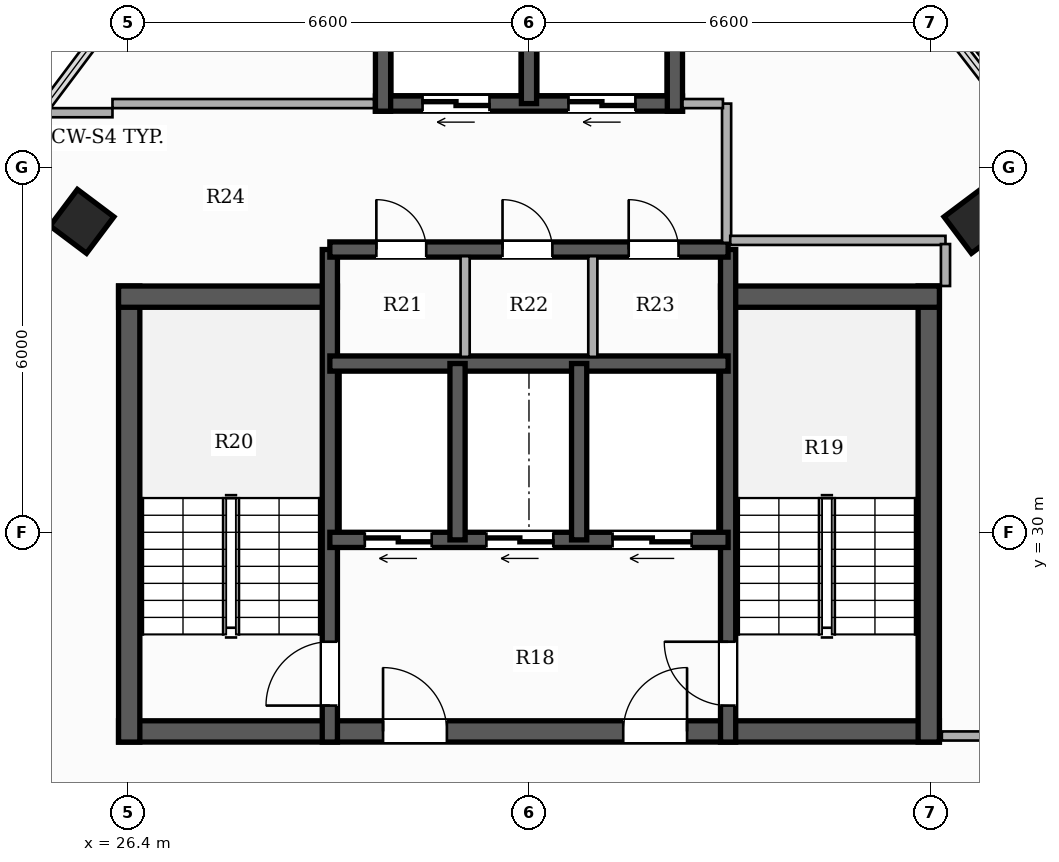
"""IFC4 building model, lengths in metres.
Left out: names, types, materials, properties, quantities, classifications, styles, units other than length and angle.
Written with IfcOpenShell. Run it as: python <this file> out.ifc"""

import sys

from ifc_helpers import new_model, si_unit, direction, frame, frame_2d, origin, origin_2d, place, context, subcontext, project, spatial, rectangle, hollow_rectangle, extrude, element, fill, save


model = new_model("IFC4")
c1 = context("Model", 3, precision=1e-05, world=origin(), true_north=direction((0.0, 1.0)))
c2 = subcontext(c1, "Body", "Model", "MODEL_VIEW")
j1 = project(units=[si_unit("LENGTHUNIT", "METRE"), si_unit("PLANEANGLEUNIT", "RADIAN")], contexts=[c1])
p1 = place(None, origin())
s1 = spatial("IfcSite", under=j1, at=p1, CompositionType="ELEMENT")
p2 = place(p1, origin())
s2 = spatial("IfcBuilding", under=s1, at=p2, CompositionType="ELEMENT")
p3 = place(p2, frame((0.0, 0.0, 240.35)))
s3 = spatial("IfcBuildingStorey", under=s2, at=p3, CompositionType="ELEMENT", Elevation=240.35)
p4 = place(p3, frame((26.25, 26.725, 0.0), z_axis=(0.0, 0.0, 1.0), x_axis=(1.0, 0.0, 0.0)))
e1 = element("IfcWall", 1, at=p4, inside=s3, PredefinedType="SHEAR", context=c2, shape_type="SweptSolid", body=[
    extrude(rectangle(XDim=13.5, YDim=0.35, at=frame_2d((6.75, 0.0))), origin(), (0.0, 0.0, 1.0), 3.3),
])
p5 = place(p4, frame((4.35, 0.0, 0.0)))
e2 = element("IfcOpeningElement", 2, at=p5, cuts=e1, PredefinedType="OPENING", context=c2, shape_type="SweptSolid", body=[
    extrude(rectangle(XDim=1.05, YDim=2.15, at=frame_2d((0.525, 1.075))), frame((0.0, 0.185, 0.0), z_axis=(0.0, -1.0, 0.0), x_axis=(1.0, 0.0, 0.0)), (0.0, 0.0, 1.0), 0.37),
])
p6 = place(p4, frame((8.3, 0.0, 0.0)))
e3 = element("IfcOpeningElement", 3, at=p6, cuts=e1, PredefinedType="OPENING", context=c2, shape_type="SweptSolid", body=[
    extrude(rectangle(XDim=1.05, YDim=2.15, at=frame_2d((0.525, 1.075))), frame((0.0, 0.185, 0.0), z_axis=(0.0, -1.0, 0.0), x_axis=(1.0, 0.0, 0.0)), (0.0, 0.0, 1.0), 0.37),
])
p7 = place(p3, frame((26.425, 26.55, 0.0), z_axis=(0.0, 0.0, 1.0), x_axis=(0.0, 1.0, 0.0)))
e4 = element("IfcWall", 4, at=p7, inside=s3, PredefinedType="SHEAR", context=c2, shape_type="SweptSolid", body=[
    extrude(rectangle(XDim=7.5, YDim=0.35, at=frame_2d((3.75, 0.0))), origin(), (0.0, 0.0, 1.0), 3.3),
])
p8 = place(p3, frame((26.25, 33.875, 0.0), z_axis=(0.0, 0.0, 1.0), x_axis=(1.0, 0.0, 0.0)))
e5 = element("IfcWall", 5, at=p8, inside=s3, PredefinedType="SHEAR", context=c2, shape_type="SweptSolid", body=[
    extrude(rectangle(XDim=3.6, YDim=0.35, at=frame_2d((1.8, 0.0))), origin(), (0.0, 0.0, 1.0), 3.3),
])
p9 = place(p3, frame((39.575, 26.55, 0.0), z_axis=(0.0, 0.0, 1.0), x_axis=(0.0, 1.0, 0.0)))
e6 = element("IfcWall", 6, at=p9, inside=s3, PredefinedType="SHEAR", context=c2, shape_type="SweptSolid", body=[
    extrude(rectangle(XDim=7.5, YDim=0.35, at=frame_2d((3.75, 0.0))), origin(), (0.0, 0.0, 1.0), 3.3),
])
p10 = place(p3, frame((36.15, 33.875, 0.0), z_axis=(0.0, 0.0, 1.0), x_axis=(1.0, 0.0, 0.0)))
e7 = element("IfcWall", 7, at=p10, inside=s3, PredefinedType="SHEAR", context=c2, shape_type="SweptSolid", body=[
    extrude(rectangle(XDim=3.6, YDim=0.35, at=frame_2d((1.8, 0.0))), origin(), (0.0, 0.0, 1.0), 3.3),
])
p11 = place(p3, frame((29.725, 26.55, 0.0), z_axis=(0.0, 0.0, 1.0), x_axis=(0.0, 1.0, 0.0)))
e8 = element("IfcWall", 8, at=p11, inside=s3, PredefinedType="SHEAR", context=c2, shape_type="SweptSolid", body=[
    extrude(rectangle(XDim=8.1, YDim=0.25, at=frame_2d((4.05, 0.0))), origin(), (0.0, 0.0, 1.0), 3.3),
])
p12 = place(p11, frame((0.6, 0.0, 0.0)))
e9 = element("IfcOpeningElement", 9, at=p12, cuts=e8, PredefinedType="OPENING", context=c2, shape_type="SweptSolid", body=[
    extrude(rectangle(XDim=1.05, YDim=2.15, at=frame_2d((0.525, 1.075))), frame((0.0, 0.135, 0.0), z_axis=(0.0, -1.0, 0.0), x_axis=(1.0, 0.0, 0.0)), (0.0, 0.0, 1.0), 0.27),
])
p13 = place(p3, frame((36.275, 26.55, 0.0), z_axis=(0.0, 0.0, 1.0), x_axis=(0.0, 1.0, 0.0)))
e10 = element("IfcWall", 10, at=p13, inside=s3, PredefinedType="SHEAR", context=c2, shape_type="SweptSolid", body=[
    extrude(rectangle(XDim=8.1, YDim=0.25, at=frame_2d((4.05, 0.0))), origin(), (0.0, 0.0, 1.0), 3.3),
])
p14 = place(p13, frame((0.6, 0.0, 0.0)))
e11 = element("IfcOpeningElement", 11, at=p14, cuts=e10, PredefinedType="OPENING", context=c2, shape_type="SweptSolid", body=[
    extrude(rectangle(XDim=1.05, YDim=2.15, at=frame_2d((0.525, 1.075))), frame((0.0, 0.135, 0.0), z_axis=(0.0, -1.0, 0.0), x_axis=(1.0, 0.0, 0.0)), (0.0, 0.0, 1.0), 0.27),
])
p15 = place(p3, frame((36.275, 29.875, 0.0), z_axis=(0.0, 0.0, 1.0), x_axis=(-1.0, 0.0, 0.0)))
e12 = element("IfcWall", 12, at=p15, inside=s3, PredefinedType="SHEAR", context=c2, shape_type="SweptSolid", body=[
    extrude(rectangle(XDim=6.55, YDim=0.25, at=frame_2d((3.275, 0.0))), origin(), (0.0, 0.0, 1.0), 3.3),
])
p16 = place(p15, frame((4.875, 0.0, 0.0)))
e13 = element("IfcOpeningElement", 13, at=p16, cuts=e12, PredefinedType="OPENING", context=c2, shape_type="SweptSolid", body=[
    extrude(rectangle(XDim=1.1, YDim=2.2, at=frame_2d((0.55, 1.1))), frame((0.0, 0.135, 0.0), z_axis=(0.0, -1.0, 0.0), x_axis=(1.0, 0.0, 0.0)), (0.0, 0.0, 1.0), 0.27),
])
p17 = place(p15, frame((2.875, 0.0, 0.0)))
e14 = element("IfcOpeningElement", 14, at=p17, cuts=e12, PredefinedType="OPENING", context=c2, shape_type="SweptSolid", body=[
    extrude(rectangle(XDim=1.1, YDim=2.2, at=frame_2d((0.55, 1.1))), frame((0.0, 0.135, 0.0), z_axis=(0.0, -1.0, 0.0), x_axis=(1.0, 0.0, 0.0)), (0.0, 0.0, 1.0), 0.27),
])
p18 = place(p15, frame((0.6, 0.0, 0.0)))
e15 = element("IfcOpeningElement", 15, at=p18, cuts=e12, PredefinedType="OPENING", context=c2, shape_type="SweptSolid", body=[
    extrude(rectangle(XDim=1.3, YDim=2.2, at=frame_2d((0.65, 1.1))), frame((0.0, 0.135, 0.0), z_axis=(0.0, -1.0, 0.0), x_axis=(1.0, 0.0, 0.0)), (0.0, 0.0, 1.0), 0.27),
])
p19 = place(p3, frame((29.725, 32.775, 0.0), z_axis=(0.0, 0.0, 1.0), x_axis=(1.0, 0.0, 0.0)))
e16 = element("IfcWall", 16, at=p19, inside=s3, PredefinedType="SHEAR", context=c2, shape_type="SweptSolid", body=[
    extrude(rectangle(XDim=6.55, YDim=0.25, at=frame_2d((3.275, 0.0))), origin(), (0.0, 0.0, 1.0), 3.3),
])
for number, where, z_axis, x_axis in (
    (17, (31.825, 29.875, 0.0), (0.0, 0.0, 1.0), (0.0, 1.0, 0.0)),
    (18, (33.825, 29.875, 0.0), (0.0, 0.0, 1.0), (0.0, 1.0, 0.0)),
):
    element("IfcWall", number, at=place(p3, frame(where, z_axis=z_axis, x_axis=x_axis)), inside=s3, PredefinedType="SHEAR", context=c2, shape_type="SweptSolid", body=[
        extrude(rectangle(XDim=2.9, YDim=0.25, at=frame_2d((1.45, 0.0))), origin(), (0.0, 0.0, 1.0), 3.3),
    ])
p20 = place(p3, frame((29.725, 34.65, 0.0), z_axis=(0.0, 0.0, 1.0), x_axis=(1.0, 0.0, 0.0)))
e19 = element("IfcWall", 19, at=p20, inside=s3, PredefinedType="SHEAR", context=c2, shape_type="SweptSolid", body=[
    extrude(rectangle(XDim=6.55, YDim=0.25, at=frame_2d((3.275, 0.0))), origin(), (0.0, 0.0, 1.0), 3.3),
])
p21 = place(p20, frame((0.765, 0.0, 0.0)))
e20 = element("IfcOpeningElement", 20, at=p21, cuts=e19, PredefinedType="OPENING", context=c2, shape_type="SweptSolid", body=[
    extrude(rectangle(XDim=0.82, YDim=2.1, at=frame_2d((0.41, 1.05))), frame((0.0, 0.135, 0.0), z_axis=(0.0, -1.0, 0.0), x_axis=(1.0, 0.0, 0.0)), (0.0, 0.0, 1.0), 0.27),
])
p22 = place(p20, frame((2.84, 0.0, 0.0)))
e21 = element("IfcOpeningElement", 21, at=p22, cuts=e19, PredefinedType="OPENING", context=c2, shape_type="SweptSolid", body=[
    extrude(rectangle(XDim=0.82, YDim=2.1, at=frame_2d((0.41, 1.05))), frame((0.0, 0.135, 0.0), z_axis=(0.0, -1.0, 0.0), x_axis=(1.0, 0.0, 0.0)), (0.0, 0.0, 1.0), 0.27),
])
p23 = place(p20, frame((4.915, 0.0, 0.0)))
e22 = element("IfcOpeningElement", 22, at=p23, cuts=e19, PredefinedType="OPENING", context=c2, shape_type="SweptSolid", body=[
    extrude(rectangle(XDim=0.82, YDim=2.1, at=frame_2d((0.41, 1.05))), frame((0.0, 0.135, 0.0), z_axis=(0.0, -1.0, 0.0), x_axis=(1.0, 0.0, 0.0)), (0.0, 0.0, 1.0), 0.27),
])
p24 = place(p3, frame((35.525, 37.05, 0.0), z_axis=(0.0, 0.0, 1.0), x_axis=(-1.0, 0.0, 0.0)))
e23 = element("IfcWall", 23, at=p24, inside=s3, PredefinedType="SHEAR", context=c2, shape_type="SweptSolid", body=[
    extrude(rectangle(XDim=5.05, YDim=0.25, at=frame_2d((2.525, 0.0))), origin(), (0.0, 0.0, 1.0), 3.3),
])
p25 = place(p24, frame((3.175, 0.0, 0.0)))
e24 = element("IfcOpeningElement", 24, at=p25, cuts=e23, PredefinedType="OPENING", context=c2, shape_type="SweptSolid", body=[
    extrude(rectangle(XDim=1.1, YDim=2.2, at=frame_2d((0.55, 1.1))), frame((0.0, 0.135, 0.0), z_axis=(0.0, -1.0, 0.0), x_axis=(1.0, 0.0, 0.0)), (0.0, 0.0, 1.0), 0.27),
])
p26 = place(p24, frame((0.775, 0.0, 0.0)))
e25 = element("IfcOpeningElement", 25, at=p26, cuts=e23, PredefinedType="OPENING", context=c2, shape_type="SweptSolid", body=[
    extrude(rectangle(XDim=1.1, YDim=2.2, at=frame_2d((0.55, 1.1))), frame((0.0, 0.135, 0.0), z_axis=(0.0, -1.0, 0.0), x_axis=(1.0, 0.0, 0.0)), (0.0, 0.0, 1.0), 0.27),
])
for number, where, z_axis, x_axis in (
    (26, (30.6, 36.925, 0.0), (0.0, 0.0, 1.0), (0.0, 1.0, 0.0)),
    (27, (35.4, 36.925, 0.0), (0.0, 0.0, 1.0), (0.0, 1.0, 0.0)),
):
    element("IfcWall", number, at=place(p3, frame(where, z_axis=z_axis, x_axis=x_axis)), inside=s3, PredefinedType="SHEAR", context=c2, shape_type="SweptSolid", body=[
        extrude(rectangle(XDim=2.8, YDim=0.25, at=frame_2d((1.4, 0.0))), origin(), (0.0, 0.0, 1.0), 3.3),
    ])
p27 = place(p3, frame((33.0, 37.05, 0.0), z_axis=(0.0, 0.0, 1.0), x_axis=(0.0, 1.0, 0.0)))
e28 = element("IfcWall", 28, at=p27, inside=s3, PredefinedType="SHEAR", context=c2, shape_type="SweptSolid", body=[
    extrude(rectangle(XDim=2.55, YDim=0.25, at=frame_2d((1.275, 0.0))), origin(), (0.0, 0.0, 1.0), 3.3),
])
for number, where, z_axis, x_axis in (
    (29, (25.648, 35.113, 0.0), (0.0, 0.0, 1.0), (0.6, 0.8, 0.0)),
    (30, (40.352, 35.113, 0.0), (0.0, 0.0, 1.0), (-0.6, 0.8, 0.0)),
):
    element("IfcColumn", number, at=place(p3, frame(where, z_axis=z_axis, x_axis=x_axis)), inside=s3, PredefinedType="COLUMN", context=c2, shape_type="SweptSolid", body=[
        extrude(hollow_rectangle(XDim=0.75, YDim=0.75, WallThickness=0.025, at=origin_2d()), origin(), (0.0, 0.0, 1.0), 3.3),
    ])
p28 = place(p3, frame((36.25, 34.76, 0.0), z_axis=(0.0, 0.0, 1.0), x_axis=(0.0, 1.0, 0.0)))
e31 = element("IfcWall", 31, at=p28, inside=s3, PredefinedType="PARTITIONING", context=c2, shape_type="SweptSolid", body=[
    extrude(rectangle(XDim=2.29, YDim=0.15, at=frame_2d((1.145, 0.0))), origin(), (0.0, 0.0, 1.0), 2.425),
])
p29 = place(p3, frame((35.525, 37.05, 0.0), z_axis=(0.0, 0.0, 1.0), x_axis=(1.0, 0.0, 0.0)))
e32 = element("IfcWall", 32, at=p29, inside=s3, PredefinedType="PARTITIONING", context=c2, shape_type="SweptSolid", body=[
    extrude(rectangle(XDim=0.665, YDim=0.15, at=frame_2d((0.333, 0.0))), origin(), (0.0, 0.0, 1.0), 2.425),
])
for number, where, z_axis, x_axis in (
    (33, (31.95, 32.885, 0.0), (0.0, 0.0, 1.0), (0.0, 1.0, 0.0)),
    (34, (34.05, 32.885, 0.0), (0.0, 0.0, 1.0), (0.0, 1.0, 0.0)),
):
    element("IfcWall", number, at=place(p3, frame(where, z_axis=z_axis, x_axis=x_axis)), inside=s3, PredefinedType="PARTITIONING", context=c2, shape_type="SweptSolid", body=[
        extrude(rectangle(XDim=1.655, YDim=0.15, at=frame_2d((0.828, 0.0))), origin(), (0.0, 0.0, 1.0), 3.06),
    ])
p30 = place(p3, frame((24.846, 36.9, 0.0), z_axis=(0.0, 0.0, 1.0), x_axis=(1.0, 0.0, 0.0)))
e35 = element("IfcWall", 35, at=p30, inside=s3, PredefinedType="PARTITIONING", context=c2, shape_type="SweptSolid", body=[
    extrude(rectangle(XDim=1.304, YDim=0.15, at=frame_2d((0.652, 0.0))), origin(), (0.0, 0.0, 1.0), 2.619),
])
p31 = place(p3, frame((39.79, 26.65, 0.0), z_axis=(0.0, 0.0, 1.0), x_axis=(1.0, 0.0, 0.0)))
e36 = element("IfcWall", 36, at=p31, inside=s3, PredefinedType="PARTITIONING", context=c2, shape_type="SweptSolid", body=[
    extrude(rectangle(XDim=2.46, YDim=0.15, at=frame_2d((1.23, 0.0))), origin(), (0.0, 0.0, 1.0), 2.565),
])
p32 = place(p3, frame((26.15, 37.05, 0.0), z_axis=(0.0, 0.0, 1.0), x_axis=(1.0, 0.0, 0.0)))
e37 = element("IfcWall", 37, at=p32, inside=s3, PredefinedType="PARTITIONING", context=c2, shape_type="SweptSolid", body=[
    extrude(rectangle(XDim=4.3, YDim=0.15, at=frame_2d((2.15, 0.0))), origin(), (0.0, 0.0, 1.0), 2.425),
])
p33 = place(p3, frame((36.31, 34.8, 0.0), z_axis=(0.0, 0.0, 1.0), x_axis=(1.0, 0.0, 0.0)))
e38 = element("IfcWall", 38, at=p33, inside=s3, PredefinedType="PARTITIONING", context=c2, shape_type="SweptSolid", body=[
    extrude(rectangle(XDim=3.54, YDim=0.15, at=frame_2d((1.77, 0.0))), origin(), (0.0, 0.0, 1.0), 2.425),
])
p34 = place(p3, frame((39.85, 34.74, 0.0), z_axis=(0.0, 0.0, 1.0), x_axis=(0.0, -1.0, 0.0)))
e39 = element("IfcWall", 39, at=p34, inside=s3, PredefinedType="PARTITIONING", context=c2, shape_type="SweptSolid", body=[
    extrude(rectangle(XDim=0.69, YDim=0.15, at=frame_2d((0.345, 0.0))), origin(), (0.0, 0.0, 1.0), 2.773),
])
p35 = place(p12, origin())
e40 = element("IfcDoor", 40, at=p35, inside=s3, OperationType="SINGLE_SWING_LEFT", PredefinedType="DOOR", context=c2, shape_type="SweptSolid", body=[
    extrude(rectangle(XDim=1.05, YDim=2.15, at=frame_2d((0.525, 1.075))), frame((0.0, 0.025, 0.0), z_axis=(0.0, -1.0, 0.0), x_axis=(1.0, 0.0, 0.0)), (0.0, 0.0, 1.0), 0.05),
])
fill(e9, e40)
p36 = place(p14, origin())
e41 = element("IfcDoor", 41, at=p36, inside=s3, OperationType="SINGLE_SWING_RIGHT", PredefinedType="DOOR", context=c2, shape_type="SweptSolid", body=[
    extrude(rectangle(XDim=1.05, YDim=2.15, at=frame_2d((0.525, 1.075))), frame((0.0, 0.025, 0.0), z_axis=(0.0, -1.0, 0.0), x_axis=(1.0, 0.0, 0.0)), (0.0, 0.0, 1.0), 0.05),
])
fill(e11, e41)
p37 = place(p5, origin())
e42 = element("IfcDoor", 42, at=p37, inside=s3, OperationType="SINGLE_SWING_LEFT", PredefinedType="DOOR", context=c2, shape_type="SweptSolid", body=[
    extrude(rectangle(XDim=1.05, YDim=2.15, at=frame_2d((0.525, 1.075))), frame((0.0, 0.025, 0.0), z_axis=(0.0, -1.0, 0.0), x_axis=(1.0, 0.0, 0.0)), (0.0, 0.0, 1.0), 0.05),
])
fill(e2, e42)
p38 = place(p6, origin())
e43 = element("IfcDoor", 43, at=p38, inside=s3, OperationType="SINGLE_SWING_RIGHT", PredefinedType="DOOR", context=c2, shape_type="SweptSolid", body=[
    extrude(rectangle(XDim=1.05, YDim=2.15, at=frame_2d((0.525, 1.075))), frame((0.0, 0.025, 0.0), z_axis=(0.0, -1.0, 0.0), x_axis=(1.0, 0.0, 0.0)), (0.0, 0.0, 1.0), 0.05),
])
fill(e3, e43)
p39 = place(p16, origin())
e44 = element("IfcDoor", 44, at=p39, inside=s3, OperationType="DOUBLE_DOOR_SLIDING", PredefinedType="DOOR", context=c2, shape_type="SweptSolid", body=[
    extrude(rectangle(XDim=1.1, YDim=2.2, at=frame_2d((0.55, 1.1))), frame((0.0, 0.025, 0.0), z_axis=(0.0, -1.0, 0.0), x_axis=(1.0, 0.0, 0.0)), (0.0, 0.0, 1.0), 0.05),
])
fill(e13, e44)
p40 = place(p17, origin())
e45 = element("IfcDoor", 45, at=p40, inside=s3, OperationType="DOUBLE_DOOR_SLIDING", PredefinedType="DOOR", context=c2, shape_type="SweptSolid", body=[
    extrude(rectangle(XDim=1.1, YDim=2.2, at=frame_2d((0.55, 1.1))), frame((0.0, 0.025, 0.0), z_axis=(0.0, -1.0, 0.0), x_axis=(1.0, 0.0, 0.0)), (0.0, 0.0, 1.0), 0.05),
])
fill(e14, e45)
p41 = place(p18, origin())
e46 = element("IfcDoor", 46, at=p41, inside=s3, OperationType="DOUBLE_DOOR_SLIDING", PredefinedType="DOOR", context=c2, shape_type="SweptSolid", body=[
    extrude(rectangle(XDim=1.3, YDim=2.2, at=frame_2d((0.65, 1.1))), frame((0.0, 0.025, 0.0), z_axis=(0.0, -1.0, 0.0), x_axis=(1.0, 0.0, 0.0)), (0.0, 0.0, 1.0), 0.05),
])
fill(e15, e46)
p42 = place(p25, origin())
e47 = element("IfcDoor", 47, at=p42, inside=s3, OperationType="DOUBLE_DOOR_SLIDING", PredefinedType="DOOR", context=c2, shape_type="SweptSolid", body=[
    extrude(rectangle(XDim=1.1, YDim=2.2, at=frame_2d((0.55, 1.1))), frame((0.0, 0.025, 0.0), z_axis=(0.0, -1.0, 0.0), x_axis=(1.0, 0.0, 0.0)), (0.0, 0.0, 1.0), 0.05),
])
fill(e24, e47)
p43 = place(p26, origin())
e48 = element("IfcDoor", 48, at=p43, inside=s3, OperationType="DOUBLE_DOOR_SLIDING", PredefinedType="DOOR", context=c2, shape_type="SweptSolid", body=[
    extrude(rectangle(XDim=1.1, YDim=2.2, at=frame_2d((0.55, 1.1))), frame((0.0, 0.025, 0.0), z_axis=(0.0, -1.0, 0.0), x_axis=(1.0, 0.0, 0.0)), (0.0, 0.0, 1.0), 0.05),
])
fill(e25, e48)
p44 = place(p21, origin())
e49 = element("IfcDoor", 49, at=p44, inside=s3, OperationType="SINGLE_SWING_LEFT", PredefinedType="DOOR", context=c2, shape_type="SweptSolid", body=[
    extrude(rectangle(XDim=0.82, YDim=2.1, at=frame_2d((0.41, 1.05))), frame((0.0, 0.025, 0.0), z_axis=(0.0, -1.0, 0.0), x_axis=(1.0, 0.0, 0.0)), (0.0, 0.0, 1.0), 0.05),
])
fill(e20, e49)
p45 = place(p22, origin())
e50 = element("IfcDoor", 50, at=p45, inside=s3, OperationType="SINGLE_SWING_LEFT", PredefinedType="DOOR", context=c2, shape_type="SweptSolid", body=[
    extrude(rectangle(XDim=0.82, YDim=2.1, at=frame_2d((0.41, 1.05))), frame((0.0, 0.025, 0.0), z_axis=(0.0, -1.0, 0.0), x_axis=(1.0, 0.0, 0.0)), (0.0, 0.0, 1.0), 0.05),
])
fill(e21, e50)
p46 = place(p23, origin())
e51 = element("IfcDoor", 51, at=p46, inside=s3, OperationType="SINGLE_SWING_LEFT", PredefinedType="DOOR", context=c2, shape_type="SweptSolid", body=[
    extrude(rectangle(XDim=0.82, YDim=2.1, at=frame_2d((0.41, 1.05))), frame((0.0, 0.025, 0.0), z_axis=(0.0, -1.0, 0.0), x_axis=(1.0, 0.0, 0.0)), (0.0, 0.0, 1.0), 0.05),
])
fill(e22, e51)
save(model, sys.argv[1])
